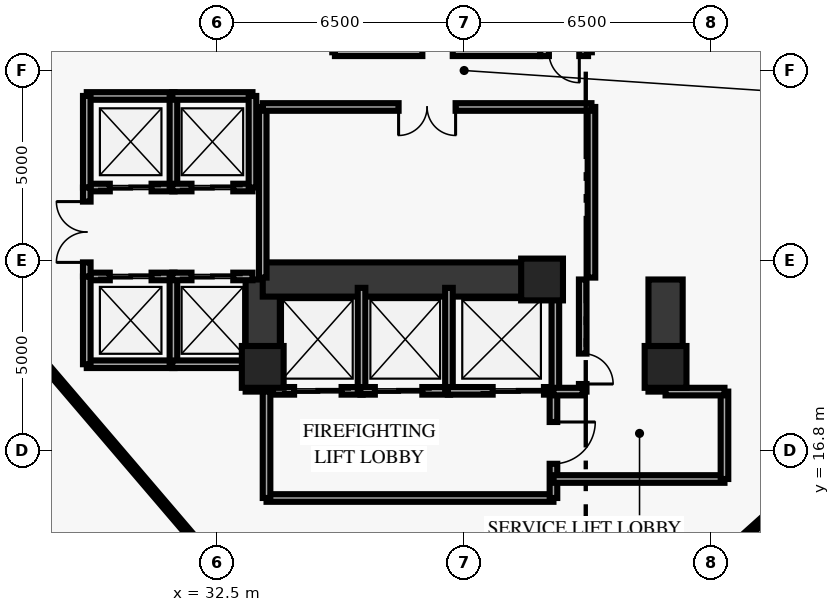
"""IFC4 building model, lengths in metres.
Left out: names, types, materials, properties, quantities, classifications, styles, units other than length and angle.
Written with IfcOpenShell. Run it as: python <this file> out.ifc"""

import sys

from ifc_helpers import new_model, si_unit, direction, frame, frame_2d, origin, origin_2d, place, context, subcontext, project, spatial, rectangle, extrude, element, fill, save


model = new_model("IFC4")
c1 = context("Model", 3, precision=1e-05, world=origin(), true_north=direction((0.0, 1.0)))
c2 = subcontext(c1, "Body", "Model", "MODEL_VIEW")
j1 = project(units=[si_unit("LENGTHUNIT", "METRE"), si_unit("PLANEANGLEUNIT", "RADIAN")], contexts=[c1])
p1 = place(None, origin())
s1 = spatial("IfcSite", under=j1, at=p1, CompositionType="ELEMENT")
p2 = place(p1, origin())
s2 = spatial("IfcBuilding", under=s1, at=p2, CompositionType="ELEMENT")
p3 = place(p2, frame((0.0, 0.0, -9.0)))
s3 = spatial("IfcBuildingStorey", under=s2, at=p3, CompositionType="ELEMENT", Elevation=-9.0)
for number, where, z_axis, x_axis in (
    (1, (33.7, 19.0, 0.0), (0.0, 0.0, 1.0), (1.0, 0.0, 0.0)),
    (2, (41.05, 21.3, 0.0), (0.0, 0.0, 1.0), (1.0, 0.0, 0.0)),
    (3, (44.3, 19.0, 0.0), (0.0, 0.0, 1.0), (1.0, 0.0, 0.0)),
):
    element("IfcColumn", number, at=place(p3, frame(where, z_axis=z_axis, x_axis=x_axis)), inside=s3, PredefinedType="PILASTER", context=c2, shape_type="SweptSolid", body=[
        extrude(rectangle(XDim=1.1, YDim=1.1, at=origin_2d()), origin(), (0.0, 0.0, 1.0), 4.2),
    ])
for number, where, z_axis, x_axis in (
    (4, (33.7, 18.35, 0.0), (0.0, 0.0, 1.0), (0.0, 1.0, 0.0)),
    (5, (44.3, 18.35, 0.0), (0.0, 0.0, 1.0), (0.0, 1.0, 0.0)),
):
    element("IfcWall", number, at=place(p3, frame(where, z_axis=z_axis, x_axis=x_axis)), inside=s3, PredefinedType="SHEAR", context=c2, shape_type="SweptSolid", body=[
        extrude(rectangle(XDim=2.95, YDim=0.9, at=frame_2d((1.475, 0.0))), origin(), (0.0, 0.0, 1.0), 4.2),
    ])
p4 = place(p3, frame((33.7, 21.3, 0.0), z_axis=(0.0, 0.0, 1.0), x_axis=(1.0, 0.0, 0.0)))
e6 = element("IfcWall", 6, at=p4, inside=s3, PredefinedType="SHEAR", context=c2, shape_type="SweptSolid", body=[
    extrude(rectangle(XDim=7.55, YDim=0.9, at=frame_2d((3.775, 0.0))), origin(), (0.0, 0.0, 1.0), 4.2),
])
p5 = place(p3, frame((41.0, 27.28, 0.0), z_axis=(0.0, 0.0, 1.0), x_axis=(1.0, 0.0, 0.0)))
e7 = element("IfcWall", 7, at=p5, inside=s3, PredefinedType="SOLIDWALL", context=c2, shape_type="SweptSolid", body=[
    extrude(rectangle(XDim=1.26, YDim=0.2, at=frame_2d((0.63, 0.0))), origin(), (0.0, 0.0, 1.0), 4.2),
])
p6 = place(p5, frame((0.23, 0.0, 0.0)))
e8 = element("IfcOpeningElement", 8, at=p6, cuts=e7, PredefinedType="OPENING", context=c2, shape_type="SweptSolid", body=[
    extrude(rectangle(XDim=0.8, YDim=2.05, at=frame_2d((0.4, 1.025))), frame((0.0, 0.11, 0.0), z_axis=(0.0, -1.0, 0.0), x_axis=(1.0, 0.0, 0.0)), (0.0, 0.0, 1.0), 0.22),
])
p7 = place(p3, frame((29.07, 23.72, 0.0), z_axis=(0.0, 0.0, 1.0), x_axis=(1.0, 0.0, 0.0)))
e9 = element("IfcWall", 9, at=p7, inside=s3, PredefinedType="SOLIDWALL", context=c2, shape_type="SweptSolid", body=[
    extrude(rectangle(XDim=2.31, YDim=0.2, at=frame_2d((1.155, 0.0))), origin(), (0.0, 0.0, 1.0), 4.2),
])
p8 = place(p7, frame((0.605, 0.0, 0.0)))
e10 = element("IfcOpeningElement", 10, at=p8, cuts=e9, PredefinedType="OPENING", context=c2, shape_type="SweptSolid", body=[
    extrude(rectangle(XDim=1.1, YDim=2.15, at=frame_2d((0.55, 1.075))), frame((0.0, 0.11, 0.0), z_axis=(0.0, -1.0, 0.0), x_axis=(1.0, 0.0, 0.0)), (0.0, 0.0, 1.0), 0.22),
])
p9 = place(p3, frame((29.07, 26.13, 0.0), z_axis=(0.0, 0.0, 1.0), x_axis=(1.0, 0.0, 0.0)))
e11 = element("IfcWall", 11, at=p9, inside=s3, PredefinedType="SOLIDWALL", context=c2, shape_type="SweptSolid", body=[
    extrude(rectangle(XDim=2.31, YDim=0.2, at=frame_2d((1.155, 0.0))), origin(), (0.0, 0.0, 1.0), 4.2),
])
for number, where, z_axis, x_axis in (
    (12, (29.07, 23.72, 0.0), (0.0, 0.0, 1.0), (0.0, 1.0, 0.0)),
    (13, (31.35, 23.72, 0.0), (0.0, 0.0, 1.0), (0.0, 1.0, 0.0)),
):
    element("IfcWall", number, at=place(p3, frame(where, z_axis=z_axis, x_axis=x_axis)), inside=s3, PredefinedType="SOLIDWALL", context=c2, shape_type="SweptSolid", body=[
        extrude(rectangle(XDim=2.41, YDim=0.2, at=frame_2d((1.205, 0.0))), origin(), (0.0, 0.0, 1.0), 4.2),
    ])
p10 = place(p3, frame((31.32, 23.72, 0.0), z_axis=(0.0, 0.0, 1.0), x_axis=(1.0, 0.0, 0.0)))
e14 = element("IfcWall", 14, at=p10, inside=s3, PredefinedType="SOLIDWALL", context=c2, shape_type="SweptSolid", body=[
    extrude(rectangle(XDim=2.11, YDim=0.2, at=frame_2d((1.055, 0.0))), origin(), (0.0, 0.0, 1.0), 4.2),
])
p11 = place(p10, frame((0.505, 0.0, 0.0)))
e15 = element("IfcOpeningElement", 15, at=p11, cuts=e14, PredefinedType="OPENING", context=c2, shape_type="SweptSolid", body=[
    extrude(rectangle(XDim=1.1, YDim=2.15, at=frame_2d((0.55, 1.075))), frame((0.0, 0.11, 0.0), z_axis=(0.0, -1.0, 0.0), x_axis=(1.0, 0.0, 0.0)), (0.0, 0.0, 1.0), 0.22),
])
p12 = place(p3, frame((31.32, 26.13, 0.0), z_axis=(0.0, 0.0, 1.0), x_axis=(1.0, 0.0, 0.0)))
e16 = element("IfcWall", 16, at=p12, inside=s3, PredefinedType="SOLIDWALL", context=c2, shape_type="SweptSolid", body=[
    extrude(rectangle(XDim=2.11, YDim=0.2, at=frame_2d((1.055, 0.0))), origin(), (0.0, 0.0, 1.0), 4.2),
])
p13 = place(p3, frame((33.43, 23.72, 0.0), z_axis=(0.0, 0.0, 1.0), x_axis=(0.0, 1.0, 0.0)))
e17 = element("IfcWall", 17, at=p13, inside=s3, PredefinedType="SOLIDWALL", context=c2, shape_type="SweptSolid", body=[
    extrude(rectangle(XDim=2.41, YDim=0.2, at=frame_2d((1.205, 0.0))), origin(), (0.0, 0.0, 1.0), 4.2),
])
p14 = place(p3, frame((29.07, 19.07, 0.0), z_axis=(0.0, 0.0, 1.0), x_axis=(1.0, 0.0, 0.0)))
e18 = element("IfcWall", 18, at=p14, inside=s3, PredefinedType="SOLIDWALL", context=c2, shape_type="SweptSolid", body=[
    extrude(rectangle(XDim=2.31, YDim=0.2, at=frame_2d((1.155, 0.0))), origin(), (0.0, 0.0, 1.0), 4.2),
])
p15 = place(p3, frame((29.07, 21.38, 0.0), z_axis=(0.0, 0.0, 1.0), x_axis=(1.0, 0.0, 0.0)))
e19 = element("IfcWall", 19, at=p15, inside=s3, PredefinedType="SOLIDWALL", context=c2, shape_type="SweptSolid", body=[
    extrude(rectangle(XDim=2.31, YDim=0.2, at=frame_2d((1.155, 0.0))), origin(), (0.0, 0.0, 1.0), 4.2),
])
p16 = place(p15, frame((0.605, 0.0, 0.0)))
e20 = element("IfcOpeningElement", 20, at=p16, cuts=e19, PredefinedType="OPENING", context=c2, shape_type="SweptSolid", body=[
    extrude(rectangle(XDim=1.1, YDim=2.15, at=frame_2d((0.55, 1.075))), frame((0.0, 0.11, 0.0), z_axis=(0.0, -1.0, 0.0), x_axis=(1.0, 0.0, 0.0)), (0.0, 0.0, 1.0), 0.22),
])
for number, where, z_axis, x_axis in (
    (21, (29.07, 19.07, 0.0), (0.0, 0.0, 1.0), (0.0, 1.0, 0.0)),
    (22, (31.35, 19.07, 0.0), (0.0, 0.0, 1.0), (0.0, 1.0, 0.0)),
):
    element("IfcWall", number, at=place(p3, frame(where, z_axis=z_axis, x_axis=x_axis)), inside=s3, PredefinedType="SOLIDWALL", context=c2, shape_type="SweptSolid", body=[
        extrude(rectangle(XDim=2.31, YDim=0.2, at=frame_2d((1.155, 0.0))), origin(), (0.0, 0.0, 1.0), 4.2),
    ])
p17 = place(p3, frame((31.32, 19.07, 0.0), z_axis=(0.0, 0.0, 1.0), x_axis=(1.0, 0.0, 0.0)))
e23 = element("IfcWall", 23, at=p17, inside=s3, PredefinedType="SOLIDWALL", context=c2, shape_type="SweptSolid", body=[
    extrude(rectangle(XDim=2.11, YDim=0.2, at=frame_2d((1.055, 0.0))), origin(), (0.0, 0.0, 1.0), 4.2),
])
p18 = place(p3, frame((31.32, 21.38, 0.0), z_axis=(0.0, 0.0, 1.0), x_axis=(1.0, 0.0, 0.0)))
e24 = element("IfcWall", 24, at=p18, inside=s3, PredefinedType="SOLIDWALL", context=c2, shape_type="SweptSolid", body=[
    extrude(rectangle(XDim=2.11, YDim=0.2, at=frame_2d((1.055, 0.0))), origin(), (0.0, 0.0, 1.0), 4.2),
])
p19 = place(p18, frame((0.505, 0.0, 0.0)))
e25 = element("IfcOpeningElement", 25, at=p19, cuts=e24, PredefinedType="OPENING", context=c2, shape_type="SweptSolid", body=[
    extrude(rectangle(XDim=1.1, YDim=2.15, at=frame_2d((0.55, 1.075))), frame((0.0, 0.11, 0.0), z_axis=(0.0, -1.0, 0.0), x_axis=(1.0, 0.0, 0.0)), (0.0, 0.0, 1.0), 0.22),
])
p20 = place(p3, frame((33.97, 18.37, 0.0), z_axis=(0.0, 0.0, 1.0), x_axis=(1.0, 0.0, 0.0)))
e26 = element("IfcWall", 26, at=p20, inside=s3, PredefinedType="SOLIDWALL", context=c2, shape_type="SweptSolid", body=[
    extrude(rectangle(XDim=2.36, YDim=0.2, at=frame_2d((1.18, 0.0))), origin(), (0.0, 0.0, 1.0), 4.2),
])
p21 = place(p20, frame((0.555, 0.0, 0.0)))
e27 = element("IfcOpeningElement", 27, at=p21, cuts=e26, PredefinedType="OPENING", context=c2, shape_type="SweptSolid", body=[
    extrude(rectangle(XDim=1.25, YDim=2.2, at=frame_2d((0.625, 1.1))), frame((0.0, 0.11, 0.0), z_axis=(0.0, -1.0, 0.0), x_axis=(1.0, 0.0, 0.0)), (0.0, 0.0, 1.0), 0.22),
])
p22 = place(p3, frame((36.3, 18.37, 0.0), z_axis=(0.0, 0.0, 1.0), x_axis=(0.0, 1.0, 0.0)))
e28 = element("IfcWall", 28, at=p22, inside=s3, PredefinedType="SOLIDWALL", context=c2, shape_type="SweptSolid", body=[
    extrude(rectangle(XDim=2.71, YDim=0.2, at=frame_2d((1.355, 0.0))), origin(), (0.0, 0.0, 1.0), 4.2),
])
p23 = place(p3, frame((36.27, 18.37, 0.0), z_axis=(0.0, 0.0, 1.0), x_axis=(1.0, 0.0, 0.0)))
e29 = element("IfcWall", 29, at=p23, inside=s3, PredefinedType="SOLIDWALL", context=c2, shape_type="SweptSolid", body=[
    extrude(rectangle(XDim=2.36, YDim=0.2, at=frame_2d((1.18, 0.0))), origin(), (0.0, 0.0, 1.0), 4.2),
])
p24 = place(p23, frame((0.38, 0.0, 0.0)))
e30 = element("IfcOpeningElement", 30, at=p24, cuts=e29, PredefinedType="OPENING", context=c2, shape_type="SweptSolid", body=[
    extrude(rectangle(XDim=1.25, YDim=2.2, at=frame_2d((0.625, 1.1))), frame((0.0, 0.11, 0.0), z_axis=(0.0, -1.0, 0.0), x_axis=(1.0, 0.0, 0.0)), (0.0, 0.0, 1.0), 0.22),
])
p25 = place(p3, frame((38.6, 18.37, 0.0), z_axis=(0.0, 0.0, 1.0), x_axis=(0.0, 1.0, 0.0)))
e31 = element("IfcWall", 31, at=p25, inside=s3, PredefinedType="SOLIDWALL", context=c2, shape_type="SweptSolid", body=[
    extrude(rectangle(XDim=2.71, YDim=0.2, at=frame_2d((1.355, 0.0))), origin(), (0.0, 0.0, 1.0), 4.2),
])
p26 = place(p3, frame((38.57, 18.37, 0.0), z_axis=(0.0, 0.0, 1.0), x_axis=(1.0, 0.0, 0.0)))
e32 = element("IfcWall", 32, at=p26, inside=s3, PredefinedType="SOLIDWALL", context=c2, shape_type="SweptSolid", body=[
    extrude(rectangle(XDim=2.83, YDim=0.2, at=frame_2d((1.415, 0.0))), origin(), (0.0, 0.0, 1.0), 4.2),
])
p27 = place(p26, frame((1.18, 0.0, 0.0)))
e33 = element("IfcOpeningElement", 33, at=p27, cuts=e32, PredefinedType="OPENING", context=c2, shape_type="SweptSolid", body=[
    extrude(rectangle(XDim=1.35, YDim=2.18, at=frame_2d((0.675, 1.09))), frame((0.0, 0.11, 0.0), z_axis=(0.0, -1.0, 0.0), x_axis=(1.0, 0.0, 0.0)), (0.0, 0.0, 1.0), 0.22),
])
p28 = place(p3, frame((41.4, 18.37, 0.0), z_axis=(0.0, 0.0, 1.0), x_axis=(0.0, 1.0, 0.0)))
e34 = element("IfcWall", 34, at=p28, inside=s3, PredefinedType="SOLIDWALL", context=c2, shape_type="SweptSolid", body=[
    extrude(rectangle(XDim=2.71, YDim=0.2, at=frame_2d((1.355, 0.0))), origin(), (0.0, 0.0, 1.0), 4.2),
])
p29 = place(p3, frame((29.07, 21.38, 0.0), z_axis=(0.0, 0.0, 1.0), x_axis=(0.0, 1.0, 0.0)))
e35 = element("IfcWall", 35, at=p29, inside=s3, PredefinedType="SOLIDWALL", context=c2, shape_type="SweptSolid", body=[
    extrude(rectangle(XDim=2.34, YDim=0.2, at=frame_2d((1.17, 0.0))), origin(), (0.0, 0.0, 1.0), 4.2),
])
p30 = place(p29, frame((0.37, 0.0, 0.0)))
e36 = element("IfcOpeningElement", 36, at=p30, cuts=e35, PredefinedType="OPENING", context=c2, shape_type="SweptSolid", body=[
    extrude(rectangle(XDim=1.6, YDim=2.2, at=frame_2d((0.8, 1.1))), frame((0.0, 0.11, 0.0), z_axis=(0.0, -1.0, 0.0), x_axis=(1.0, 0.0, 0.0)), (0.0, 0.0, 1.0), 0.22),
])
for number, where, z_axis, x_axis in (
    (37, (33.7, 21.35, 0.0), (0.0, 0.0, 1.0), (0.0, 1.0, 0.0)),
    (38, (42.35, 21.35, 0.0), (0.0, 0.0, 1.0), (0.0, 1.0, 0.0)),
):
    element("IfcWall", number, at=place(p3, frame(where, z_axis=z_axis, x_axis=x_axis)), inside=s3, PredefinedType="SOLIDWALL", context=c2, shape_type="SweptSolid", body=[
        extrude(rectangle(XDim=4.49, YDim=0.2, at=frame_2d((2.245, 0.0))), origin(), (0.0, 0.0, 1.0), 4.2),
    ])
p31 = place(p3, frame((42.35, 25.84, 0.0), z_axis=(0.0, 0.0, 1.0), x_axis=(-1.0, 0.0, 0.0)))
e39 = element("IfcWall", 39, at=p31, inside=s3, PredefinedType="SOLIDWALL", context=c2, shape_type="SweptSolid", body=[
    extrude(rectangle(XDim=8.65, YDim=0.2, at=frame_2d((4.325, 0.0))), origin(), (0.0, 0.0, 1.0), 4.2),
])
p32 = place(p31, frame((3.575, 0.0, 0.0)))
e40 = element("IfcOpeningElement", 40, at=p32, cuts=e39, PredefinedType="OPENING", context=c2, shape_type="SweptSolid", body=[
    extrude(rectangle(XDim=1.5, YDim=2.2, at=frame_2d((0.75, 1.1))), frame((0.0, 0.11, 0.0), z_axis=(0.0, -1.0, 0.0), x_axis=(1.0, 0.0, 0.0)), (0.0, 0.0, 1.0), 0.22),
])
p33 = place(p3, frame((35.6, 27.28, 0.0), z_axis=(0.0, 0.0, 1.0), x_axis=(1.0, 0.0, 0.0)))
e41 = element("IfcWall", 41, at=p33, inside=s3, PredefinedType="SOLIDWALL", context=c2, shape_type="SweptSolid", body=[
    extrude(rectangle(XDim=5.4, YDim=0.2, at=frame_2d((2.7, 0.0))), origin(), (0.0, 0.0, 1.0), 4.2),
])
p34 = place(p33, frame((2.3, 0.0, 0.0)))
e42 = element("IfcOpeningElement", 42, at=p34, cuts=e41, PredefinedType="OPENING", context=c2, shape_type="SweptSolid", body=[
    extrude(rectangle(XDim=0.8, YDim=2.05, at=frame_2d((0.4, 1.025))), frame((0.0, 0.11, 0.0), z_axis=(0.0, -1.0, 0.0), x_axis=(1.0, 0.0, 0.0)), (0.0, 0.0, 1.0), 0.22),
])
p35 = place(p3, frame((33.8, 15.55, 0.0), z_axis=(0.0, 0.0, 1.0), x_axis=(1.0, 0.0, 0.0)))
e43 = element("IfcWall", 43, at=p35, inside=s3, PredefinedType="SOLIDWALL", context=c2, shape_type="SweptSolid", body=[
    extrude(rectangle(XDim=7.55, YDim=0.2, at=frame_2d((3.775, 0.0))), origin(), (0.0, 0.0, 1.0), 4.2),
])
p36 = place(p3, frame((33.8, 15.55, 0.0), z_axis=(0.0, 0.0, 1.0), x_axis=(0.0, 1.0, 0.0)))
e44 = element("IfcWall", 44, at=p36, inside=s3, PredefinedType="SOLIDWALL", context=c2, shape_type="SweptSolid", body=[
    extrude(rectangle(XDim=2.8, YDim=0.2, at=frame_2d((1.4, 0.0))), origin(), (0.0, 0.0, 1.0), 4.2),
])
p37 = place(p3, frame((41.35, 15.55, 0.0), z_axis=(0.0, 0.0, 1.0), x_axis=(0.0, 1.0, 0.0)))
e45 = element("IfcWall", 45, at=p37, inside=s3, PredefinedType="SOLIDWALL", context=c2, shape_type="SweptSolid", body=[
    extrude(rectangle(XDim=2.8, YDim=0.2, at=frame_2d((1.4, 0.0))), origin(), (0.0, 0.0, 1.0), 4.2),
])
p38 = place(p37, frame((0.9, 0.0, 0.0)))
e46 = element("IfcOpeningElement", 46, at=p38, cuts=e45, PredefinedType="OPENING", context=c2, shape_type="SweptSolid", body=[
    extrude(rectangle(XDim=1.1, YDim=2.15, at=frame_2d((0.55, 1.075))), frame((0.0, 0.11, 0.0), z_axis=(0.0, -1.0, 0.0), x_axis=(1.0, 0.0, 0.0)), (0.0, 0.0, 1.0), 0.22),
])
p39 = place(p3, frame((41.35, 16.05, 0.0), z_axis=(0.0, 0.0, 1.0), x_axis=(1.0, 0.0, 0.0)))
e47 = element("IfcWall", 47, at=p39, inside=s3, PredefinedType="SOLIDWALL", context=c2, shape_type="SweptSolid", body=[
    extrude(rectangle(XDim=4.5, YDim=0.2, at=frame_2d((2.25, 0.0))), origin(), (0.0, 0.0, 1.0), 4.2),
])
p40 = place(p3, frame((45.85, 16.05, 0.0), z_axis=(0.0, 0.0, 1.0), x_axis=(0.0, 1.0, 0.0)))
e48 = element("IfcWall", 48, at=p40, inside=s3, PredefinedType="SOLIDWALL", context=c2, shape_type="SweptSolid", body=[
    extrude(rectangle(XDim=2.3, YDim=0.2, at=frame_2d((1.15, 0.0))), origin(), (0.0, 0.0, 1.0), 4.2),
])
p41 = place(p3, frame((44.3, 18.35, 0.0), z_axis=(0.0, 0.0, 1.0), x_axis=(1.0, 0.0, 0.0)))
e49 = element("IfcWall", 49, at=p41, inside=s3, PredefinedType="SOLIDWALL", context=c2, shape_type="SweptSolid", body=[
    extrude(rectangle(XDim=1.55, YDim=0.2, at=frame_2d((0.775, 0.0))), origin(), (0.0, 0.0, 1.0), 4.2),
])
p42 = place(p3, frame((42.12, 18.35, 0.0), z_axis=(0.0, 0.0, 1.0), x_axis=(0.0, 1.0, 0.0)))
e50 = element("IfcWall", 50, at=p42, inside=s3, PredefinedType="SOLIDWALL", context=c2, shape_type="SweptSolid", body=[
    extrude(rectangle(XDim=2.95, YDim=0.2, at=frame_2d((1.475, 0.0))), origin(), (0.0, 0.0, 1.0), 4.2),
])
p43 = place(p42, frame((0.2, 0.0, 0.0)))
e51 = element("IfcOpeningElement", 51, at=p43, cuts=e50, PredefinedType="OPENING", context=c2, shape_type="SweptSolid", body=[
    extrude(rectangle(XDim=0.8, YDim=2.05, at=frame_2d((0.4, 1.025))), frame((0.0, 0.11, 0.0), z_axis=(0.0, -1.0, 0.0), x_axis=(1.0, 0.0, 0.0)), (0.0, 0.0, 1.0), 0.22),
])
p44 = place(p3, frame((41.35, 18.35, 0.0), z_axis=(0.0, 0.0, 1.0), x_axis=(1.0, 0.0, 0.0)))
e52 = element("IfcWall", 52, at=p44, inside=s3, PredefinedType="SOLIDWALL", context=c2, shape_type="SweptSolid", body=[
    extrude(rectangle(XDim=0.77, YDim=0.2, at=frame_2d((0.385, 0.0))), origin(), (0.0, 0.0, 1.0), 4.2),
])
p45 = place(p3, frame((27.811, 19.24, 0.0), z_axis=(0.0, 0.0, 1.0), x_axis=(0.649652680018, -0.760231145998, 0.0)))
e53 = element("IfcWall", 53, at=p45, inside=s3, PredefinedType="PARTITIONING", context=c2, shape_type="SweptSolid", body=[
    extrude(rectangle(XDim=7.279, YDim=0.16, at=frame_2d((3.64, 0.0))), origin(), (0.0, 0.0, 1.0), 4.2),
])
p46 = place(p3, frame((45.46, 13.706, 0.0), z_axis=(0.0, 0.0, 1.0), x_axis=(0.744066617248, 0.668105432621, 0.0)))
e54 = element("IfcWall", 54, at=p46, inside=s3, PredefinedType="PARTITIONING", context=c2, shape_type="SweptSolid", body=[
    extrude(rectangle(XDim=3.596, YDim=0.16, at=frame_2d((1.798, 0.0))), origin(), (0.0, 0.0, 1.0), 4.2),
])
p47 = place(p6, origin())
e55 = element("IfcDoor", 55, at=p47, inside=s3, OperationType="SINGLE_SWING_RIGHT", PredefinedType="DOOR", context=c2, shape_type="SweptSolid", body=[
    extrude(rectangle(XDim=0.8, YDim=2.05, at=frame_2d((0.4, 1.025))), frame((0.0, 0.025, 0.0), z_axis=(0.0, -1.0, 0.0), x_axis=(1.0, 0.0, 0.0)), (0.0, 0.0, 1.0), 0.05),
])
fill(e8, e55)
p48 = place(p8, origin())
e56 = element("IfcDoor", 56, at=p48, inside=s3, OperationType="DOUBLE_DOOR_SLIDING", PredefinedType="DOOR", context=c2, shape_type="SweptSolid", body=[
    extrude(rectangle(XDim=1.1, YDim=2.15, at=frame_2d((0.55, 1.075))), frame((0.0, 0.025, 0.0), z_axis=(0.0, -1.0, 0.0), x_axis=(1.0, 0.0, 0.0)), (0.0, 0.0, 1.0), 0.05),
])
fill(e10, e56)
p49 = place(p11, origin())
e57 = element("IfcDoor", 57, at=p49, inside=s3, OperationType="DOUBLE_DOOR_SLIDING", PredefinedType="DOOR", context=c2, shape_type="SweptSolid", body=[
    extrude(rectangle(XDim=1.1, YDim=2.15, at=frame_2d((0.55, 1.075))), frame((0.0, 0.025, 0.0), z_axis=(0.0, -1.0, 0.0), x_axis=(1.0, 0.0, 0.0)), (0.0, 0.0, 1.0), 0.05),
])
fill(e15, e57)
p50 = place(p16, origin())
e58 = element("IfcDoor", 58, at=p50, inside=s3, OperationType="DOUBLE_DOOR_SLIDING", PredefinedType="DOOR", context=c2, shape_type="SweptSolid", body=[
    extrude(rectangle(XDim=1.1, YDim=2.15, at=frame_2d((0.55, 1.075))), frame((0.0, 0.025, 0.0), z_axis=(0.0, -1.0, 0.0), x_axis=(1.0, 0.0, 0.0)), (0.0, 0.0, 1.0), 0.05),
])
fill(e20, e58)
p51 = place(p19, origin())
e59 = element("IfcDoor", 59, at=p51, inside=s3, OperationType="DOUBLE_DOOR_SLIDING", PredefinedType="DOOR", context=c2, shape_type="SweptSolid", body=[
    extrude(rectangle(XDim=1.1, YDim=2.15, at=frame_2d((0.55, 1.075))), frame((0.0, 0.025, 0.0), z_axis=(0.0, -1.0, 0.0), x_axis=(1.0, 0.0, 0.0)), (0.0, 0.0, 1.0), 0.05),
])
fill(e25, e59)
p52 = place(p21, origin())
e60 = element("IfcDoor", 60, at=p52, inside=s3, OperationType="DOUBLE_DOOR_SLIDING", PredefinedType="DOOR", context=c2, shape_type="SweptSolid", body=[
    extrude(rectangle(XDim=1.25, YDim=2.2, at=frame_2d((0.625, 1.1))), frame((0.0, 0.025, 0.0), z_axis=(0.0, -1.0, 0.0), x_axis=(1.0, 0.0, 0.0)), (0.0, 0.0, 1.0), 0.05),
])
fill(e27, e60)
p53 = place(p24, origin())
e61 = element("IfcDoor", 61, at=p53, inside=s3, OperationType="DOUBLE_DOOR_SLIDING", PredefinedType="DOOR", context=c2, shape_type="SweptSolid", body=[
    extrude(rectangle(XDim=1.25, YDim=2.2, at=frame_2d((0.625, 1.1))), frame((0.0, 0.025, 0.0), z_axis=(0.0, -1.0, 0.0), x_axis=(1.0, 0.0, 0.0)), (0.0, 0.0, 1.0), 0.05),
])
fill(e30, e61)
p54 = place(p27, origin())
e62 = element("IfcDoor", 62, at=p54, inside=s3, OperationType="DOUBLE_DOOR_SLIDING", PredefinedType="DOOR", context=c2, shape_type="SweptSolid", body=[
    extrude(rectangle(XDim=1.35, YDim=2.18, at=frame_2d((0.675, 1.09))), frame((0.0, 0.025, 0.0), z_axis=(0.0, -1.0, 0.0), x_axis=(1.0, 0.0, 0.0)), (0.0, 0.0, 1.0), 0.05),
])
fill(e33, e62)
p55 = place(p30, origin())
e63 = element("IfcDoor", 63, at=p55, inside=s3, OperationType="DOUBLE_DOOR_SINGLE_SWING", PredefinedType="DOOR", context=c2, shape_type="SweptSolid", body=[
    extrude(rectangle(XDim=1.6, YDim=2.2, at=frame_2d((0.8, 1.1))), frame((0.0, 0.025, 0.0), z_axis=(0.0, -1.0, 0.0), x_axis=(1.0, 0.0, 0.0)), (0.0, 0.0, 1.0), 0.05),
])
fill(e36, e63)
p56 = place(p32, origin())
e64 = element("IfcDoor", 64, at=p56, inside=s3, OperationType="DOUBLE_DOOR_SINGLE_SWING", PredefinedType="DOOR", context=c2, shape_type="SweptSolid", body=[
    extrude(rectangle(XDim=1.5, YDim=2.2, at=frame_2d((0.75, 1.1))), frame((0.0, 0.025, 0.0), z_axis=(0.0, -1.0, 0.0), x_axis=(1.0, 0.0, 0.0)), (0.0, 0.0, 1.0), 0.05),
])
fill(e40, e64)
p57 = place(p34, origin())
e65 = element("IfcDoor", 65, at=p57, inside=s3, OperationType="SINGLE_SWING_LEFT", PredefinedType="DOOR", context=c2, shape_type="SweptSolid", body=[
    extrude(rectangle(XDim=0.8, YDim=2.05, at=frame_2d((0.4, 1.025))), frame((0.0, 0.025, 0.0), z_axis=(0.0, -1.0, 0.0), x_axis=(1.0, 0.0, 0.0)), (0.0, 0.0, 1.0), 0.05),
])
fill(e42, e65)
p58 = place(p38, origin())
e66 = element("IfcDoor", 66, at=p58, inside=s3, OperationType="SINGLE_SWING_RIGHT", PredefinedType="DOOR", context=c2, shape_type="SweptSolid", body=[
    extrude(rectangle(XDim=1.1, YDim=2.15, at=frame_2d((0.55, 1.075))), frame((0.0, 0.025, 0.0), z_axis=(0.0, -1.0, 0.0), x_axis=(1.0, 0.0, 0.0)), (0.0, 0.0, 1.0), 0.05),
])
fill(e46, e66)
p59 = place(p43, origin())
e67 = element("IfcDoor", 67, at=p59, inside=s3, OperationType="SINGLE_SWING_LEFT", PredefinedType="DOOR", context=c2, shape_type="SweptSolid", body=[
    extrude(rectangle(XDim=0.8, YDim=2.05, at=frame_2d((0.4, 1.025))), frame((0.0, 0.025, 0.0), z_axis=(0.0, -1.0, 0.0), x_axis=(1.0, 0.0, 0.0)), (0.0, 0.0, 1.0), 0.05),
])
fill(e51, e67)
save(model, sys.argv[1])
